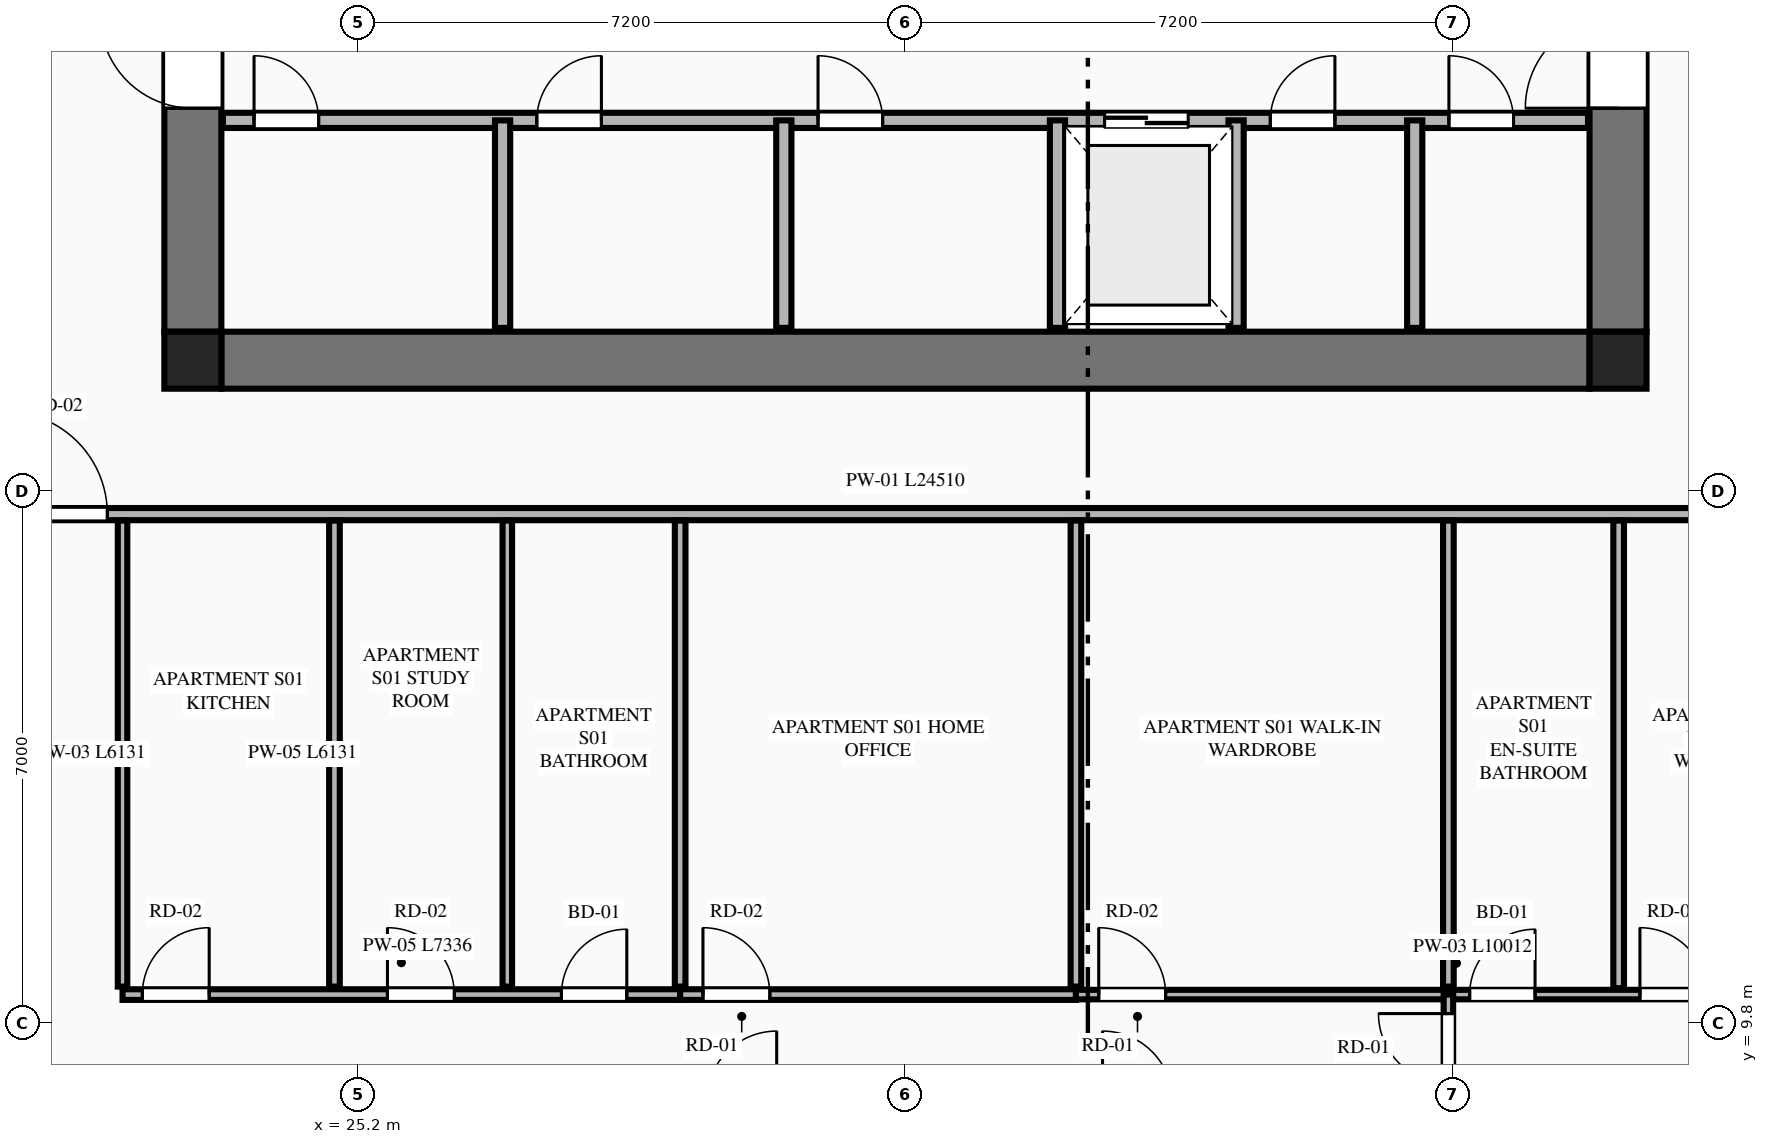
"""IFC4 building model, lengths in metres.
Left out: names, types, materials, properties, quantities, classifications, styles, units other than length and angle.
Written with IfcOpenShell. Run it as: python <this file> out.ifc"""

import sys

from ifc_helpers import new_model, si_unit, direction, frame, frame_2d, origin, origin_2d, place, context, subcontext, project, spatial, rectangle, extrude, element, fill, save


model = new_model("IFC4")
c1 = context("Model", 3, precision=1e-05, world=origin(), true_north=direction((0.0, 1.0)))
c2 = subcontext(c1, "Body", "Model", "MODEL_VIEW")
j1 = project(units=[si_unit("LENGTHUNIT", "METRE"), si_unit("PLANEANGLEUNIT", "RADIAN")], contexts=[c1])
p1 = place(None, origin())
s1 = spatial("IfcSite", under=j1, at=p1, CompositionType="ELEMENT")
p2 = place(p1, origin())
s2 = spatial("IfcBuilding", under=s1, at=p2, CompositionType="ELEMENT")
p3 = place(p2, frame((0.0, 0.0, 119.7)))
s3 = spatial("IfcBuildingStorey", under=s2, at=p3, CompositionType="ELEMENT", Elevation=119.7)
for number, where, z_axis, x_axis in (
    (1, (23.025, 18.525, 0.0), (0.0, 0.0, 1.0), (1.0, 0.0, 0.0)),
    (2, (41.775, 18.525, 0.0), (0.0, 0.0, 1.0), (1.0, 0.0, 0.0)),
):
    element("IfcColumn", number, at=place(p3, frame(where, z_axis=z_axis, x_axis=x_axis)), inside=s3, PredefinedType="COLUMN", context=c2, shape_type="SweptSolid", body=[
        extrude(rectangle(XDim=0.75, YDim=0.75, at=origin_2d()), origin(), (0.0, 0.0, 1.0), 3.55),
    ])
p4 = place(p3, frame((23.4, 18.525, 0.0), z_axis=(0.0, 0.0, 1.0), x_axis=(1.0, 0.0, 0.0)))
e3 = element("IfcWall", 3, at=p4, inside=s3, PredefinedType="SHEAR", context=c2, shape_type="SweptSolid", body=[
    extrude(rectangle(XDim=18.0, YDim=0.75, at=frame_2d((9.0, 0.0))), origin(), (0.0, 0.0, 1.0), 3.34),
])
p5 = place(p3, frame((23.025, 18.9, 0.0), z_axis=(0.0, 0.0, 1.0), x_axis=(0.0, 1.0, 0.0)))
e4 = element("IfcWall", 4, at=p5, inside=s3, PredefinedType="SHEAR", context=c2, shape_type="SweptSolid", body=[
    extrude(rectangle(XDim=14.0, YDim=0.75, at=frame_2d((7.0, 0.0))), origin(), (0.0, 0.0, 1.0), 3.34),
])
p6 = place(p5, frame((2.94, 0.0, 0.0)))
e5 = element("IfcOpeningElement", 5, at=p6, cuts=e4, PredefinedType="OPENING", context=c2, shape_type="SweptSolid", body=[
    extrude(rectangle(XDim=1.22, YDim=2.25, at=frame_2d((0.61, 1.125))), frame((0.0, 0.385, 0.0), z_axis=(0.0, -1.0, 0.0), x_axis=(1.0, 0.0, 0.0)), (0.0, 0.0, 1.0), 0.77),
])
p7 = place(p3, frame((41.775, 18.9, 0.0), z_axis=(0.0, 0.0, 1.0), x_axis=(0.0, 1.0, 0.0)))
e6 = element("IfcWall", 6, at=p7, inside=s3, PredefinedType="SHEAR", context=c2, shape_type="SweptSolid", body=[
    extrude(rectangle(XDim=14.0, YDim=0.75, at=frame_2d((7.0, 0.0))), origin(), (0.0, 0.0, 1.0), 3.34),
])
p8 = place(p7, frame((2.94, 0.0, 0.0)))
e7 = element("IfcOpeningElement", 7, at=p8, cuts=e6, PredefinedType="OPENING", context=c2, shape_type="SweptSolid", body=[
    extrude(rectangle(XDim=1.22, YDim=2.25, at=frame_2d((0.61, 1.125))), frame((0.0, 0.385, 0.0), z_axis=(0.0, -1.0, 0.0), x_axis=(1.0, 0.0, 0.0)), (0.0, 0.0, 1.0), 0.77),
])
p9 = place(p3, frame((23.42, 21.68, 0.0), z_axis=(0.0, 0.0, 1.0), x_axis=(1.0, 0.0, 0.0)))
e8 = element("IfcWall", 8, at=p9, inside=s3, PredefinedType="PLUMBINGWALL", context=c2, shape_type="SweptSolid", body=[
    extrude(rectangle(XDim=17.96, YDim=0.2, at=frame_2d((8.98, 0.0))), origin(), (0.0, 0.0, 1.0), 3.34),
])
p10 = place(p9, frame((11.6, 0.0, 0.0)))
e9 = element("IfcOpeningElement", 9, at=p10, cuts=e8, PredefinedType="OPENING", context=c2, shape_type="SweptSolid", body=[
    extrude(rectangle(XDim=1.1, YDim=2.2, at=frame_2d((0.55, 1.1))), frame((0.0, 0.11, 0.0), z_axis=(0.0, -1.0, 0.0), x_axis=(1.0, 0.0, 0.0)), (0.0, 0.0, 1.0), 0.22),
])
p11 = place(p9, frame((0.41, 0.0, 0.0)))
e10 = element("IfcOpeningElement", 10, at=p11, cuts=e8, PredefinedType="OPENING", context=c2, shape_type="SweptSolid", body=[
    extrude(rectangle(XDim=0.85, YDim=2.05, at=frame_2d((0.425, 1.025))), frame((0.0, 0.11, 0.0), z_axis=(0.0, -1.0, 0.0), x_axis=(1.0, 0.0, 0.0)), (0.0, 0.0, 1.0), 0.22),
])
p12 = place(p9, frame((4.13, 0.0, 0.0)))
e11 = element("IfcOpeningElement", 11, at=p12, cuts=e8, PredefinedType="OPENING", context=c2, shape_type="SweptSolid", body=[
    extrude(rectangle(XDim=0.85, YDim=2.05, at=frame_2d((0.425, 1.025))), frame((0.0, 0.11, 0.0), z_axis=(0.0, -1.0, 0.0), x_axis=(1.0, 0.0, 0.0)), (0.0, 0.0, 1.0), 0.22),
])
p13 = place(p9, frame((7.83, 0.0, 0.0)))
e12 = element("IfcOpeningElement", 12, at=p13, cuts=e8, PredefinedType="OPENING", context=c2, shape_type="SweptSolid", body=[
    extrude(rectangle(XDim=0.85, YDim=2.05, at=frame_2d((0.425, 1.025))), frame((0.0, 0.11, 0.0), z_axis=(0.0, -1.0, 0.0), x_axis=(1.0, 0.0, 0.0)), (0.0, 0.0, 1.0), 0.22),
])
p14 = place(p9, frame((13.78, 0.0, 0.0)))
e13 = element("IfcOpeningElement", 13, at=p14, cuts=e8, PredefinedType="OPENING", context=c2, shape_type="SweptSolid", body=[
    extrude(rectangle(XDim=0.85, YDim=2.05, at=frame_2d((0.425, 1.025))), frame((0.0, 0.11, 0.0), z_axis=(0.0, -1.0, 0.0), x_axis=(1.0, 0.0, 0.0)), (0.0, 0.0, 1.0), 0.22),
])
p15 = place(p9, frame((16.13, 0.0, 0.0)))
e14 = element("IfcOpeningElement", 14, at=p15, cuts=e8, PredefinedType="OPENING", context=c2, shape_type="SweptSolid", body=[
    extrude(rectangle(XDim=0.85, YDim=2.05, at=frame_2d((0.425, 1.025))), frame((0.0, 0.11, 0.0), z_axis=(0.0, -1.0, 0.0), x_axis=(1.0, 0.0, 0.0)), (0.0, 0.0, 1.0), 0.22),
])
for number, where, z_axis, x_axis in (
    (15, (34.4, 18.95, 0.0), (0.0, 0.0, 1.0), (0.0, 1.0, 0.0)),
    (16, (36.75, 18.95, 0.0), (0.0, 0.0, 1.0), (0.0, 1.0, 0.0)),
    (17, (27.1, 18.95, 0.0), (0.0, 0.0, 1.0), (0.0, 1.0, 0.0)),
    (18, (30.8, 18.95, 0.0), (0.0, 0.0, 1.0), (0.0, 1.0, 0.0)),
    (19, (39.1, 18.95, 0.0), (0.0, 0.0, 1.0), (0.0, 1.0, 0.0)),
):
    element("IfcWall", number, at=place(p3, frame(where, z_axis=z_axis, x_axis=x_axis)), inside=s3, PredefinedType="PLUMBINGWALL", context=c2, shape_type="SweptSolid", body=[
        extrude(rectangle(XDim=2.73, YDim=0.2, at=frame_2d((1.365, 0.0))), origin(), (0.0, 0.0, 1.0), 3.34),
    ])
p16 = place(p3, frame((20.145, 16.5, 0.0), z_axis=(0.0, 0.0, 1.0), x_axis=(1.0, 0.0, 0.0)))
e20 = element("IfcWall", 20, at=p16, inside=s3, PredefinedType="PARTITIONING", context=c2, shape_type="SweptSolid", body=[
    extrude(rectangle(XDim=24.51, YDim=0.16, at=frame_2d((12.255, 0.0))), origin(), (0.0, 0.0, 1.0), 3.34),
])
p17 = place(p16, frame((0.405, 0.0, 0.0)))
e21 = element("IfcOpeningElement", 21, at=p17, cuts=e20, PredefinedType="OPENING", context=c2, shape_type="SweptSolid", body=[
    extrude(rectangle(XDim=1.35, YDim=2.35, at=frame_2d((0.675, 1.175))), frame((0.0, 0.09, 0.0), z_axis=(0.0, -1.0, 0.0), x_axis=(1.0, 0.0, 0.0)), (0.0, 0.0, 1.0), 0.18),
])
p18 = place(p3, frame((22.1, 10.284, 0.0), z_axis=(0.0, 0.0, 1.0), x_axis=(0.0, 1.0, 0.0)))
e22 = element("IfcWall", 22, at=p18, inside=s3, PredefinedType="PARTITIONING", context=c2, shape_type="SweptSolid", body=[
    extrude(rectangle(XDim=6.131, YDim=0.125, at=frame_2d((3.065, 0.0))), origin(), (0.0, 0.0, 1.0), 2.722),
])
p19 = place(p3, frame((22.1, 10.179, 0.0), z_axis=(0.0, 0.0, 1.0), x_axis=(1.0, 0.0, 0.0)))
e23 = element("IfcWall", 23, at=p19, inside=s3, PredefinedType="PLUMBINGWALL", context=c2, shape_type="SweptSolid", body=[
    extrude(rectangle(XDim=7.336, YDim=0.14, at=frame_2d((3.668, 0.0))), origin(), (0.0, 0.0, 1.0), 3.34),
])
p20 = place(p19, frame((5.774, 0.0, 0.0)))
e24 = element("IfcOpeningElement", 24, at=p20, cuts=e23, PredefinedType="OPENING", context=c2, shape_type="SweptSolid", body=[
    extrude(rectangle(XDim=0.86, YDim=2.1, at=frame_2d((0.43, 1.05))), frame((0.0, 0.08, 0.0), z_axis=(0.0, -1.0, 0.0), x_axis=(1.0, 0.0, 0.0)), (0.0, 0.0, 1.0), 0.16),
])
p21 = place(p19, frame((0.26, 0.0, 0.0)))
e25 = element("IfcOpeningElement", 25, at=p21, cuts=e23, PredefinedType="OPENING", context=c2, shape_type="SweptSolid", body=[
    extrude(rectangle(XDim=0.88, YDim=2.15, at=frame_2d((0.44, 1.075))), frame((0.0, 0.08, 0.0), z_axis=(0.0, -1.0, 0.0), x_axis=(1.0, 0.0, 0.0)), (0.0, 0.0, 1.0), 0.16),
])
p22 = place(p19, frame((3.485, 0.0, 0.0)))
e26 = element("IfcOpeningElement", 26, at=p22, cuts=e23, PredefinedType="OPENING", context=c2, shape_type="SweptSolid", body=[
    extrude(rectangle(XDim=0.88, YDim=2.15, at=frame_2d((0.44, 1.075))), frame((0.0, 0.08, 0.0), z_axis=(0.0, -1.0, 0.0), x_axis=(1.0, 0.0, 0.0)), (0.0, 0.0, 1.0), 0.16),
])
p23 = place(p3, frame((29.436, 10.179, 0.0), z_axis=(0.0, 0.0, 1.0), x_axis=(1.0, 0.0, 0.0)))
e27 = element("IfcWall", 27, at=p23, inside=s3, PredefinedType="PLUMBINGWALL", context=c2, shape_type="SweptSolid", body=[
    extrude(rectangle(XDim=5.207, YDim=0.14, at=frame_2d((2.604, 0.0))), origin(), (0.0, 0.0, 1.0), 3.34),
])
p24 = place(p23, frame((0.3, 0.0, 0.0)))
e28 = element("IfcOpeningElement", 28, at=p24, cuts=e27, PredefinedType="OPENING", context=c2, shape_type="SweptSolid", body=[
    extrude(rectangle(XDim=0.88, YDim=2.15, at=frame_2d((0.44, 1.075))), frame((0.0, 0.08, 0.0), z_axis=(0.0, -1.0, 0.0), x_axis=(1.0, 0.0, 0.0)), (0.0, 0.0, 1.0), 0.16),
])
p25 = place(p3, frame((34.643, 10.179, 0.0), z_axis=(0.0, 0.0, 1.0), x_axis=(1.0, 0.0, 0.0)))
e29 = element("IfcWall", 29, at=p25, inside=s3, PredefinedType="PARTITIONING", context=c2, shape_type="SweptSolid", body=[
    extrude(rectangle(XDim=10.012, YDim=0.125, at=frame_2d((5.006, 0.0))), origin(), (0.0, 0.0, 1.0), 3.34),
])
p26 = place(p25, frame((5.18, 0.0, 0.0)))
e30 = element("IfcOpeningElement", 30, at=p26, cuts=e29, PredefinedType="OPENING", context=c2, shape_type="SweptSolid", body=[
    extrude(rectangle(XDim=0.86, YDim=2.1, at=frame_2d((0.43, 1.05))), frame((0.0, 0.073, 0.0), z_axis=(0.0, -1.0, 0.0), x_axis=(1.0, 0.0, 0.0)), (0.0, 0.0, 1.0), 0.145),
])
p27 = place(p25, frame((7.42, 0.0, 0.0)))
e31 = element("IfcOpeningElement", 31, at=p27, cuts=e29, PredefinedType="OPENING", context=c2, shape_type="SweptSolid", body=[
    extrude(rectangle(XDim=0.88, YDim=2.15, at=frame_2d((0.44, 1.075))), frame((0.0, 0.073, 0.0), z_axis=(0.0, -1.0, 0.0), x_axis=(1.0, 0.0, 0.0)), (0.0, 0.0, 1.0), 0.145),
])
p28 = place(p25, frame((0.3, 0.0, 0.0)))
e32 = element("IfcOpeningElement", 32, at=p28, cuts=e29, PredefinedType="OPENING", context=c2, shape_type="SweptSolid", body=[
    extrude(rectangle(XDim=0.88, YDim=2.15, at=frame_2d((0.44, 1.075))), frame((0.0, 0.073, 0.0), z_axis=(0.0, -1.0, 0.0), x_axis=(1.0, 0.0, 0.0)), (0.0, 0.0, 1.0), 0.145),
])
p29 = place(p3, frame((24.888, 10.284, 0.0), z_axis=(0.0, 0.0, 1.0), x_axis=(0.0, 1.0, 0.0)))
e33 = element("IfcWall", 33, at=p29, inside=s3, PredefinedType="PLUMBINGWALL", context=c2, shape_type="SweptSolid", body=[
    extrude(rectangle(XDim=6.131, YDim=0.14, at=frame_2d((3.065, 0.0))), origin(), (0.0, 0.0, 1.0), 3.34),
])
p30 = place(p3, frame((27.162, 10.284, 0.0), z_axis=(0.0, 0.0, 1.0), x_axis=(0.0, 1.0, 0.0)))
e34 = element("IfcWall", 34, at=p30, inside=s3, PredefinedType="PARTITIONING", context=c2, shape_type="SweptSolid", body=[
    extrude(rectangle(XDim=6.131, YDim=0.125, at=frame_2d((3.065, 0.0))), origin(), (0.0, 0.0, 1.0), 3.34),
])
p31 = place(p3, frame((39.543, 8.849, 0.0), z_axis=(0.0, 0.0, 1.0), x_axis=(0.0, 1.0, 0.0)))
e35 = element("IfcWall", 35, at=p31, inside=s3, PredefinedType="PARTITIONING", context=c2, shape_type="SweptSolid", body=[
    extrude(rectangle(XDim=1.33, YDim=0.125, at=frame_2d((0.665, 0.0))), origin(), (0.0, 0.0, 1.0), 3.34),
])
p32 = place(p31, frame((0.16, 0.0, 0.0)))
e36 = element("IfcOpeningElement", 36, at=p32, cuts=e35, PredefinedType="OPENING", context=c2, shape_type="SweptSolid", body=[
    extrude(rectangle(XDim=0.92, YDim=2.15, at=frame_2d((0.46, 1.075))), frame((0.0, 0.073, 0.0), z_axis=(0.0, -1.0, 0.0), x_axis=(1.0, 0.0, 0.0)), (0.0, 0.0, 1.0), 0.145),
])
for number, where, z_axis, x_axis in (
    (37, (29.436, 10.284, 0.0), (0.0, 0.0, 1.0), (0.0, 1.0, 0.0)),
    (38, (34.643, 10.284, 0.0), (0.0, 0.0, 1.0), (0.0, 1.0, 0.0)),
    (39, (39.543, 10.284, 0.0), (0.0, 0.0, 1.0), (0.0, 1.0, 0.0)),
):
    element("IfcWall", number, at=place(p3, frame(where, z_axis=z_axis, x_axis=x_axis)), inside=s3, PredefinedType="PLUMBINGWALL", context=c2, shape_type="SweptSolid", body=[
        extrude(rectangle(XDim=6.131, YDim=0.14, at=frame_2d((3.065, 0.0))), origin(), (0.0, 0.0, 1.0), 3.34),
    ])
p33 = place(p3, frame((41.783, 10.264, 0.0), z_axis=(0.0, 0.0, 1.0), x_axis=(0.0, 1.0, 0.0)))
e40 = element("IfcWall", 40, at=p33, inside=s3, PredefinedType="PLUMBINGWALL", context=c2, shape_type="SweptSolid", body=[
    extrude(rectangle(XDim=6.151, YDim=0.14, at=frame_2d((3.076, 0.0))), origin(), (0.0, 0.0, 1.0), 2.722),
])
p34 = place(p6, origin())
e41 = element("IfcDoor", 41, at=p34, inside=s3, OperationType="SINGLE_SWING_RIGHT", PredefinedType="DOOR", context=c2, shape_type="SweptSolid", body=[
    extrude(rectangle(XDim=1.22, YDim=2.25, at=frame_2d((0.61, 1.125))), frame((0.0, 0.025, 0.0), z_axis=(0.0, -1.0, 0.0), x_axis=(1.0, 0.0, 0.0)), (0.0, 0.0, 1.0), 0.05),
])
fill(e5, e41)
p35 = place(p8, origin())
e42 = element("IfcDoor", 42, at=p35, inside=s3, OperationType="SINGLE_SWING_LEFT", PredefinedType="DOOR", context=c2, shape_type="SweptSolid", body=[
    extrude(rectangle(XDim=1.22, YDim=2.25, at=frame_2d((0.61, 1.125))), frame((0.0, 0.025, 0.0), z_axis=(0.0, -1.0, 0.0), x_axis=(1.0, 0.0, 0.0)), (0.0, 0.0, 1.0), 0.05),
])
fill(e7, e42)
p36 = place(p10, origin())
e43 = element("IfcDoor", 43, at=p36, inside=s3, OperationType="DOUBLE_DOOR_SLIDING", PredefinedType="DOOR", context=c2, shape_type="SweptSolid", body=[
    extrude(rectangle(XDim=1.1, YDim=2.2, at=frame_2d((0.55, 1.1))), frame((0.0, 0.025, 0.0), z_axis=(0.0, -1.0, 0.0), x_axis=(1.0, 0.0, 0.0)), (0.0, 0.0, 1.0), 0.05),
])
fill(e9, e43)
p37 = place(p11, origin())
e44 = element("IfcDoor", 44, at=p37, inside=s3, OperationType="SINGLE_SWING_LEFT", PredefinedType="DOOR", context=c2, shape_type="SweptSolid", body=[
    extrude(rectangle(XDim=0.85, YDim=2.05, at=frame_2d((0.425, 1.025))), frame((0.0, 0.025, 0.0), z_axis=(0.0, -1.0, 0.0), x_axis=(1.0, 0.0, 0.0)), (0.0, 0.0, 1.0), 0.05),
])
fill(e10, e44)
p38 = place(p12, origin())
e45 = element("IfcDoor", 45, at=p38, inside=s3, OperationType="SINGLE_SWING_RIGHT", PredefinedType="DOOR", context=c2, shape_type="SweptSolid", body=[
    extrude(rectangle(XDim=0.85, YDim=2.05, at=frame_2d((0.425, 1.025))), frame((0.0, 0.025, 0.0), z_axis=(0.0, -1.0, 0.0), x_axis=(1.0, 0.0, 0.0)), (0.0, 0.0, 1.0), 0.05),
])
fill(e11, e45)
p39 = place(p13, origin())
e46 = element("IfcDoor", 46, at=p39, inside=s3, OperationType="SINGLE_SWING_LEFT", PredefinedType="DOOR", context=c2, shape_type="SweptSolid", body=[
    extrude(rectangle(XDim=0.85, YDim=2.05, at=frame_2d((0.425, 1.025))), frame((0.0, 0.025, 0.0), z_axis=(0.0, -1.0, 0.0), x_axis=(1.0, 0.0, 0.0)), (0.0, 0.0, 1.0), 0.05),
])
fill(e12, e46)
p40 = place(p14, origin())
e47 = element("IfcDoor", 47, at=p40, inside=s3, OperationType="SINGLE_SWING_RIGHT", PredefinedType="DOOR", context=c2, shape_type="SweptSolid", body=[
    extrude(rectangle(XDim=0.85, YDim=2.05, at=frame_2d((0.425, 1.025))), frame((0.0, 0.025, 0.0), z_axis=(0.0, -1.0, 0.0), x_axis=(1.0, 0.0, 0.0)), (0.0, 0.0, 1.0), 0.05),
])
fill(e13, e47)
p41 = place(p15, origin())
e48 = element("IfcDoor", 48, at=p41, inside=s3, OperationType="SINGLE_SWING_LEFT", PredefinedType="DOOR", context=c2, shape_type="SweptSolid", body=[
    extrude(rectangle(XDim=0.85, YDim=2.05, at=frame_2d((0.425, 1.025))), frame((0.0, 0.025, 0.0), z_axis=(0.0, -1.0, 0.0), x_axis=(1.0, 0.0, 0.0)), (0.0, 0.0, 1.0), 0.05),
])
fill(e14, e48)
p42 = place(p20, origin())
e49 = element("IfcDoor", 49, at=p42, inside=s3, OperationType="SINGLE_SWING_RIGHT", PredefinedType="DOOR", context=c2, shape_type="SweptSolid", body=[
    extrude(rectangle(XDim=0.86, YDim=2.1, at=frame_2d((0.43, 1.05))), frame((0.0, 0.025, 0.0), z_axis=(0.0, -1.0, 0.0), x_axis=(1.0, 0.0, 0.0)), (0.0, 0.0, 1.0), 0.05),
])
fill(e24, e49)
p43 = place(p26, origin())
e50 = element("IfcDoor", 50, at=p43, inside=s3, OperationType="SINGLE_SWING_RIGHT", PredefinedType="DOOR", context=c2, shape_type="SweptSolid", body=[
    extrude(rectangle(XDim=0.86, YDim=2.1, at=frame_2d((0.43, 1.05))), frame((0.0, 0.025, 0.0), z_axis=(0.0, -1.0, 0.0), x_axis=(1.0, 0.0, 0.0)), (0.0, 0.0, 1.0), 0.05),
])
fill(e30, e50)
p44 = place(p27, origin())
e51 = element("IfcDoor", 51, at=p44, inside=s3, OperationType="SINGLE_SWING_LEFT", PredefinedType="DOOR", context=c2, shape_type="SweptSolid", body=[
    extrude(rectangle(XDim=0.88, YDim=2.15, at=frame_2d((0.44, 1.075))), frame((0.0, 0.025, 0.0), z_axis=(0.0, -1.0, 0.0), x_axis=(1.0, 0.0, 0.0)), (0.0, 0.0, 1.0), 0.05),
])
fill(e31, e51)
p45 = place(p17, origin())
e52 = element("IfcDoor", 52, at=p45, inside=s3, OperationType="SINGLE_SWING_LEFT", PredefinedType="DOOR", context=c2, shape_type="SweptSolid", body=[
    extrude(rectangle(XDim=1.35, YDim=2.35, at=frame_2d((0.675, 1.175))), frame((0.0, 0.025, 0.0), z_axis=(0.0, -1.0, 0.0), x_axis=(1.0, 0.0, 0.0)), (0.0, 0.0, 1.0), 0.05),
])
fill(e21, e52)
p46 = place(p21, origin())
e53 = element("IfcDoor", 53, at=p46, inside=s3, OperationType="SINGLE_SWING_RIGHT", PredefinedType="DOOR", context=c2, shape_type="SweptSolid", body=[
    extrude(rectangle(XDim=0.88, YDim=2.15, at=frame_2d((0.44, 1.075))), frame((0.0, 0.025, 0.0), z_axis=(0.0, -1.0, 0.0), x_axis=(1.0, 0.0, 0.0)), (0.0, 0.0, 1.0), 0.05),
])
fill(e25, e53)
p47 = place(p22, origin())
e54 = element("IfcDoor", 54, at=p47, inside=s3, OperationType="SINGLE_SWING_LEFT", PredefinedType="DOOR", context=c2, shape_type="SweptSolid", body=[
    extrude(rectangle(XDim=0.88, YDim=2.15, at=frame_2d((0.44, 1.075))), frame((0.0, 0.025, 0.0), z_axis=(0.0, -1.0, 0.0), x_axis=(1.0, 0.0, 0.0)), (0.0, 0.0, 1.0), 0.05),
])
fill(e26, e54)
p48 = place(p24, origin())
e55 = element("IfcDoor", 55, at=p48, inside=s3, OperationType="SINGLE_SWING_LEFT", PredefinedType="DOOR", context=c2, shape_type="SweptSolid", body=[
    extrude(rectangle(XDim=0.88, YDim=2.15, at=frame_2d((0.44, 1.075))), frame((0.0, 0.025, 0.0), z_axis=(0.0, -1.0, 0.0), x_axis=(1.0, 0.0, 0.0)), (0.0, 0.0, 1.0), 0.05),
])
fill(e28, e55)
p49 = place(p32, origin())
e56 = element("IfcDoor", 56, at=p49, inside=s3, OperationType="SINGLE_SWING_RIGHT", PredefinedType="DOOR", context=c2, shape_type="SweptSolid", body=[
    extrude(rectangle(XDim=0.92, YDim=2.15, at=frame_2d((0.46, 1.075))), frame((0.0, 0.025, 0.0), z_axis=(0.0, -1.0, 0.0), x_axis=(1.0, 0.0, 0.0)), (0.0, 0.0, 1.0), 0.05),
])
fill(e36, e56)
p50 = place(p28, origin())
e57 = element("IfcDoor", 57, at=p50, inside=s3, OperationType="SINGLE_SWING_LEFT", PredefinedType="DOOR", context=c2, shape_type="SweptSolid", body=[
    extrude(rectangle(XDim=0.88, YDim=2.15, at=frame_2d((0.44, 1.075))), frame((0.0, 0.025, 0.0), z_axis=(0.0, -1.0, 0.0), x_axis=(1.0, 0.0, 0.0)), (0.0, 0.0, 1.0), 0.05),
])
fill(e32, e57)
save(model, sys.argv[1])
